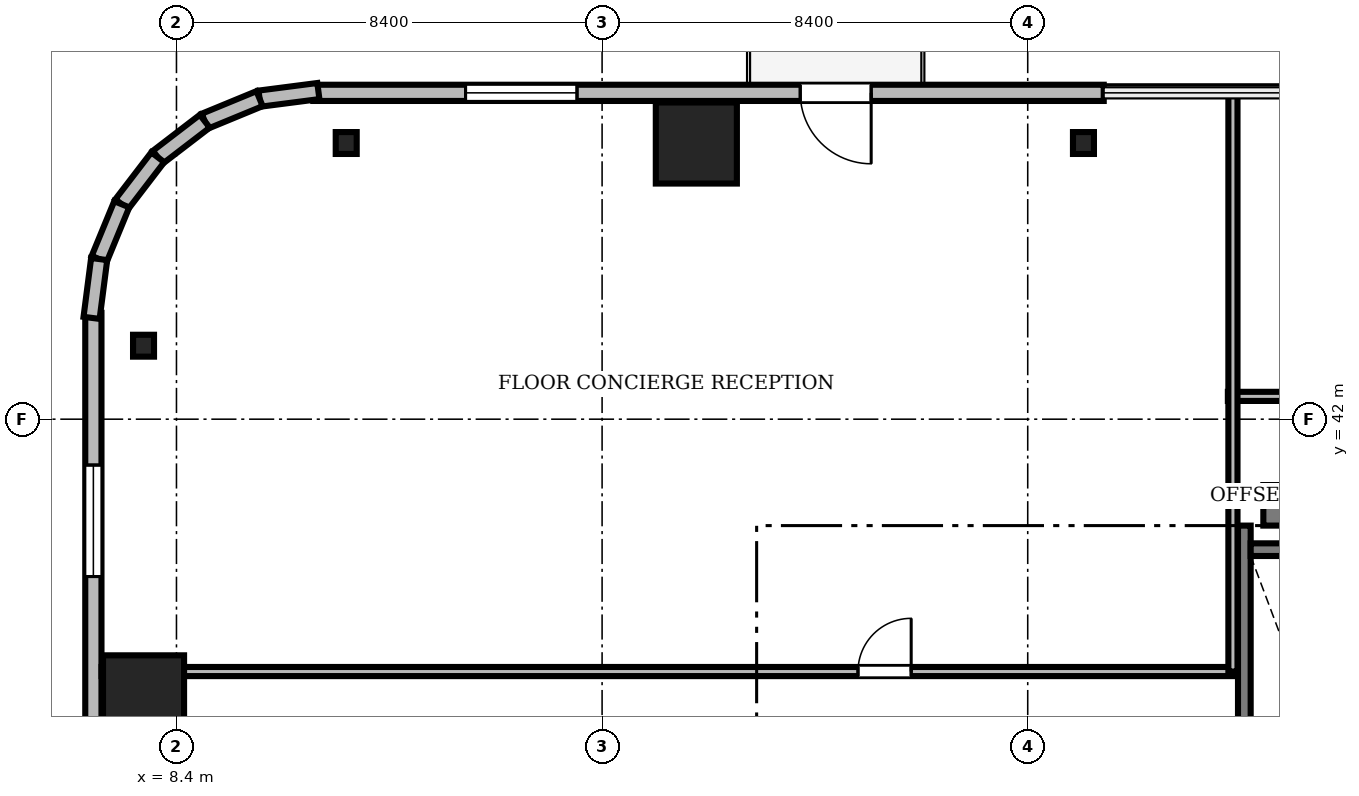
"""IFC4 building model, lengths in metres.
Left out: names, types, materials, properties, quantities, classifications, styles, units other than length and angle.
Written with IfcOpenShell. Run it as: python <this file> out.ifc"""

import sys

from ifc_helpers import new_model, si_unit, direction, frame, frame_2d, origin, origin_2d, place, context, subcontext, project, spatial, rectangle, i_section, extrude, source, transform, mapped, element, fill, save


model = new_model("IFC4")
c1 = context("Model", 3, precision=1e-05, world=origin(), true_north=direction((0.0, 1.0)))
c2 = subcontext(c1, "Body", "Model", "MODEL_VIEW")
j1 = project(units=[si_unit("LENGTHUNIT", "METRE"), si_unit("PLANEANGLEUNIT", "RADIAN")], contexts=[c1])
p1 = place(None, origin())
s1 = spatial("IfcSite", under=j1, at=p1, CompositionType="ELEMENT")
p2 = place(p1, origin())
s2 = spatial("IfcBuilding", under=s1, at=p2, CompositionType="ELEMENT")
p3 = place(p2, frame((0.0, 0.0, 122.4)))
s3 = spatial("IfcBuildingStorey", under=s2, at=p3, CompositionType="ELEMENT", Elevation=122.4)
m1 = source(origin(), c2, "Body", "SweptSolid", [
    extrude(rectangle(XDim=17.52, YDim=0.8, at=frame_2d((8.76, 0.0))), origin(), (0.0, 0.0, 1.0), 3.46),
])
p4 = place(p3, frame((29.85, 40.3, 0.0), z_axis=(0.0, 0.0, 1.0), x_axis=(1.0, 0.0, 0.0)))
e1 = element("IfcWall", 1, at=p4, inside=s3, PredefinedType="SHEAR", context=c2, shape_type="MappedRepresentation", body=[
    mapped(m1, transform((0.0, 0.0, 0.0), scale=1.0)),
])
m2 = source(origin(), c2, "Body", "SweptSolid", [
    extrude(rectangle(XDim=1.6, YDim=1.6, at=origin_2d()), origin(), (0.0, 0.0, 1.0), 3.46),
])
for number, where, z_axis, x_axis in (
    (2, (18.66, 47.45, 0.0), (0.0, 0.0, 1.0), (1.0, 0.0, 0.0)),
    (3, (7.75, 36.54, 0.0), (0.0, 0.0, 1.0), (1.0, 0.0, 0.0)),
):
    element("IfcColumn", number, at=place(p3, frame(where, z_axis=z_axis, x_axis=x_axis)), inside=s3, PredefinedType="COLUMN", context=c2, shape_type="MappedRepresentation", body=[
        mapped(m2, transform((0.0, 0.0, 0.0), scale=1.0)),
    ])
m3 = source(origin(), c2, "Body", "SweptSolid", [
    extrude(i_section(OverallWidth=0.414, OverallDepth=0.432, WebThickness=0.026, FlangeThickness=0.04, FilletRadius=0.015, at=origin_2d()), origin(), (0.0, 0.0, 1.0), 3.46),
])
for number, where, z_axis, x_axis in (
    (4, (26.3, 47.45, 0.0), (0.0, 0.0, 1.0), (1.0, 0.0, 0.0)),
    (5, (11.75, 47.45, 0.0), (0.0, 0.0, 1.0), (1.0, 0.0, 0.0)),
    (6, (7.75, 43.45, 0.0), (0.0, 0.0, 1.0), (1.0, 0.0, 0.0)),
):
    element("IfcColumn", number, at=place(p3, frame(where, z_axis=z_axis, x_axis=x_axis)), inside=s3, PredefinedType="COLUMN", context=c2, shape_type="MappedRepresentation", body=[
        mapped(m3, transform((0.0, 0.0, 0.0), scale=1.0)),
    ])
m4 = source(origin(), c2, "Body", "SweptSolid", [
    extrude(rectangle(XDim=15.6, YDim=0.32, at=frame_2d((7.8, 0.0))), origin(), (0.0, 0.0, 1.0), 3.46),
])
p5 = place(p3, frame((26.7, 48.44, 0.0), z_axis=(0.0, 0.0, 1.0), x_axis=(-1.0, 0.0, 0.0)))
e7 = element("IfcWall", 7, at=p5, inside=s3, PredefinedType="SOLIDWALL", context=c2, shape_type="MappedRepresentation", body=[
    mapped(m4, transform((0.0, 0.0, 0.0), scale=1.0)),
])
m5 = source(origin(), c2, "Body", "SweptSolid", [
    extrude(rectangle(XDim=1.4, YDim=2.3, at=frame_2d((0.7, 1.15))), frame((0.0, 0.17, 0.0), z_axis=(0.0, -1.0, 0.0), x_axis=(1.0, 0.0, 0.0)), (0.0, 0.0, 1.0), 0.34),
])
p6 = place(p5, frame((4.59, 0.0, 0.0)))
e8 = element("IfcOpeningElement", 8, at=p6, cuts=e7, PredefinedType="OPENING", context=c2, shape_type="MappedRepresentation", body=[
    mapped(m5, transform((0.0, 0.0, 0.0), scale=1.0)),
])
m6 = source(origin(), c2, "Body", "SweptSolid", [
    extrude(rectangle(XDim=2.2, YDim=2.4, at=frame_2d((1.1, 1.2))), frame((0.0, 0.17, 0.0), z_axis=(0.0, -1.0, 0.0), x_axis=(1.0, 0.0, 0.0)), (0.0, 0.0, 1.0), 0.34),
])
p7 = place(p5, frame((10.395, 0.0, 0.72)))
e9 = element("IfcOpeningElement", 9, at=p7, cuts=e7, PredefinedType="OPENING", context=c2, shape_type="MappedRepresentation", body=[
    mapped(m6, transform((0.0, 0.0, 0.0), scale=1.0)),
])
m7 = source(origin(), c2, "Body", "SweptSolid", [
    extrude(rectangle(XDim=15.6, YDim=0.32, at=frame_2d((7.8, 0.0))), origin(), (0.0, 0.0, 1.0), 3.46),
])
p8 = place(p3, frame((6.76, 44.1, 0.0), z_axis=(0.0, 0.0, 1.0), x_axis=(0.0, -1.0, 0.0)))
e10 = element("IfcWall", 10, at=p8, inside=s3, PredefinedType="SOLIDWALL", context=c2, shape_type="MappedRepresentation", body=[
    mapped(m7, transform((0.0, 0.0, 0.0), scale=1.0)),
])
p9 = place(p8, frame((3.005, 0.0, 0.72)))
e11 = element("IfcOpeningElement", 11, at=p9, cuts=e10, PredefinedType="OPENING", context=c2, shape_type="MappedRepresentation", body=[
    mapped(m6, transform((0.0, 0.0, 0.0), scale=1.0)),
])
m8 = source(origin(), c2, "Body", "SweptSolid", [
    extrude(rectangle(XDim=1.17, YDim=0.32, at=frame_2d((0.585, 0.0))), origin(), (0.0, 0.0, 1.0), 3.46),
])
p10 = place(p3, frame((11.2, 48.476, 0.0), z_axis=(0.0, 0.0, 1.0), x_axis=(-0.991735963317, -0.128295670475, 0.0)))
e12 = element("IfcWall", 12, at=p10, inside=s3, PredefinedType="SOLIDWALL", context=c2, shape_type="MappedRepresentation", body=[
    mapped(m8, transform((0.0, 0.0, 0.0), scale=1.0)),
])
m9 = source(origin(), c2, "Body", "SweptSolid", [
    extrude(rectangle(XDim=1.169, YDim=0.32, at=frame_2d((0.584, 0.0))), origin(), (0.0, 0.0, 1.0), 3.46),
])
p11 = place(p3, frame((10.04, 48.325, 0.0), z_axis=(0.0, 0.0, 1.0), x_axis=(-0.924552646638, -0.381054331552, 0.0)))
e13 = element("IfcWall", 13, at=p11, inside=s3, PredefinedType="SOLIDWALL", context=c2, shape_type="MappedRepresentation", body=[
    mapped(m9, transform((0.0, 0.0, 0.0), scale=1.0)),
])
m10 = source(origin(), c2, "Body", "SweptSolid", [
    extrude(rectangle(XDim=1.169, YDim=0.32, at=frame_2d((0.584, 0.0))), origin(), (0.0, 0.0, 1.0), 3.46),
])
p12 = place(p3, frame((8.959, 47.88, 0.0), z_axis=(0.0, 0.0, 1.0), x_axis=(-0.793663520347, -0.608356981114, 0.0)))
e14 = element("IfcWall", 14, at=p12, inside=s3, PredefinedType="SOLIDWALL", context=c2, shape_type="MappedRepresentation", body=[
    mapped(m10, transform((0.0, 0.0, 0.0), scale=1.0)),
])
m11 = source(origin(), c2, "Body", "SweptSolid", [
    extrude(rectangle(XDim=1.169, YDim=0.32, at=frame_2d((0.584, 0.0))), origin(), (0.0, 0.0, 1.0), 3.46),
])
p13 = place(p3, frame((8.031, 47.169, 0.0), z_axis=(0.0, 0.0, 1.0), x_axis=(-0.608387696831, -0.793639975269, 0.0)))
e15 = element("IfcWall", 15, at=p13, inside=s3, PredefinedType="SOLIDWALL", context=c2, shape_type="MappedRepresentation", body=[
    mapped(m11, transform((0.0, 0.0, 0.0), scale=1.0)),
])
p14 = place(p3, frame((7.32, 46.241, 0.0), z_axis=(0.0, 0.0, 1.0), x_axis=(-0.381054331552, -0.924552646638, 0.0)))
e16 = element("IfcWall", 16, at=p14, inside=s3, PredefinedType="SOLIDWALL", context=c2, shape_type="MappedRepresentation", body=[
    mapped(m9, transform((0.0, 0.0, 0.0), scale=1.0)),
])
p15 = place(p3, frame((6.875, 45.16, 0.0), z_axis=(0.0, 0.0, 1.0), x_axis=(-0.128295670475, -0.991735963317, 0.0)))
e17 = element("IfcWall", 17, at=p15, inside=s3, PredefinedType="SOLIDWALL", context=c2, shape_type="MappedRepresentation", body=[
    mapped(m8, transform((0.0, 0.0, 0.0), scale=1.0)),
])
m12 = source(origin(), c2, "Body", "SweptSolid", [
    extrude(rectangle(XDim=9.25, YDim=0.25, at=frame_2d((4.625, 0.0))), origin(), (0.0, 0.0, 1.0), 3.5),
])
p16 = place(p3, frame((29.475, 30.65, 0.0), z_axis=(0.0, 0.0, 1.0), x_axis=(0.0, 1.0, 0.0)))
e18 = element("IfcWall", 18, at=p16, inside=s3, PredefinedType="SOLIDWALL", context=c2, shape_type="MappedRepresentation", body=[
    mapped(m12, transform((0.0, 0.0, 0.0), scale=1.0)),
])
m13 = source(origin(), c2, "Body", "SweptSolid", [
    extrude(rectangle(XDim=3.15, YDim=0.25, at=frame_2d((1.575, 0.0))), origin(), (0.0, 0.0, 1.0), 3.5),
])
p17 = place(p3, frame((29.6, 39.425, 0.0), z_axis=(0.0, 0.0, 1.0), x_axis=(1.0, 0.0, 0.0)))
e19 = element("IfcWall", 19, at=p17, inside=s3, PredefinedType="SOLIDWALL", context=c2, shape_type="MappedRepresentation", body=[
    mapped(m13, transform((0.0, 0.0, 0.0), scale=1.0)),
])
m14 = source(origin(), c2, "Body", "SweptSolid", [
    extrude(rectangle(XDim=23.928, YDim=0.18, at=frame_2d((11.964, 0.0))), origin(), (0.0, 0.0, 1.0), 2.702),
])
p18 = place(p3, frame((29.15, 42.45, 0.0), z_axis=(0.0, 0.0, 1.0), x_axis=(1.0, 0.0, 0.0)))
e20 = element("IfcWall", 20, at=p18, inside=s3, PredefinedType="PARTITIONING", context=c2, shape_type="MappedRepresentation", body=[
    mapped(m14, transform((0.0, 0.0, 0.0), scale=1.0)),
])
m15 = source(origin(), c2, "Body", "SweptSolid", [
    extrude(rectangle(XDim=1.05, YDim=2.2, at=frame_2d((0.525, 1.1))), frame((0.0, 0.1, 0.0), z_axis=(0.0, -1.0, 0.0), x_axis=(1.0, 0.0, 0.0)), (0.0, 0.0, 1.0), 0.2),
])
p19 = place(p18, frame((4.5, 0.0, 0.0)))
e21 = element("IfcOpeningElement", 21, at=p19, cuts=e20, PredefinedType="OPENING", context=c2, shape_type="MappedRepresentation", body=[
    mapped(m15, transform((0.0, 0.0, 0.0), scale=1.0)),
])
m16 = source(origin(), c2, "Body", "SweptSolid", [
    extrude(rectangle(XDim=22.328, YDim=0.18, at=frame_2d((11.164, 0.0))), origin(), (0.0, 0.0, 1.0), 2.702),
])
p20 = place(p3, frame((6.922, 37.02, 0.0), z_axis=(0.0, 0.0, 1.0), x_axis=(1.0, 0.0, 0.0)))
e22 = element("IfcWall", 22, at=p20, inside=s3, PredefinedType="PARTITIONING", context=c2, shape_type="MappedRepresentation", body=[
    mapped(m16, transform((0.0, 0.0, 0.0), scale=1.0)),
])
p21 = place(p20, frame((14.928, 0.0, 0.0)))
e23 = element("IfcOpeningElement", 23, at=p21, cuts=e22, PredefinedType="OPENING", context=c2, shape_type="MappedRepresentation", body=[
    mapped(m15, transform((0.0, 0.0, 0.0), scale=1.0)),
])
m17 = source(origin(), c2, "Body", "SweptSolid", [
    extrude(rectangle(XDim=11.45, YDim=0.18, at=frame_2d((5.725, 0.0))), origin(), (0.0, 0.0, 1.0), 2.702),
])
p22 = place(p3, frame((29.25, 37.02, 0.0), z_axis=(0.0, 0.0, 1.0), x_axis=(0.0, 1.0, 0.0)))
e24 = element("IfcWall", 24, at=p22, inside=s3, PredefinedType="PARTITIONING", context=c2, shape_type="MappedRepresentation", body=[
    mapped(m17, transform((0.0, 0.0, 0.0), scale=1.0)),
])
m18 = source(origin(), c2, "Body", "SweptSolid", [
    extrude(rectangle(XDim=1.4, YDim=2.3, at=frame_2d((0.7, 1.15))), frame((0.0, 0.025, 0.0), z_axis=(0.0, -1.0, 0.0), x_axis=(1.0, 0.0, 0.0)), (0.0, 0.0, 1.0), 0.05),
])
p23 = place(p6, frame((1.4, 0.0, 0.0), z_axis=(0.0, 0.0, 1.0), x_axis=(-1.0, 0.0, 0.0)))
e25 = element("IfcDoor", 25, at=p23, inside=s3, OperationType="DOUBLE_DOOR_SLIDING", PredefinedType="DOOR", context=c2, shape_type="MappedRepresentation", body=[
    mapped(m18, transform((0.0, 0.0, 0.0), scale=1.0)),
])
fill(e8, e25)
m19 = source(origin(), c2, "Body", "SweptSolid", [
    extrude(rectangle(XDim=2.2, YDim=2.4, at=frame_2d((1.1, 1.2))), frame((0.0, 0.03, 0.0), z_axis=(0.0, -1.0, 0.0), x_axis=(1.0, 0.0, 0.0)), (0.0, 0.0, 1.0), 0.06),
])
p24 = place(p7, origin())
e26 = element("IfcWindow", 26, at=p24, inside=s3, PartitioningType="SINGLE_PANEL", PredefinedType="WINDOW", context=c2, shape_type="MappedRepresentation", body=[
    mapped(m19, transform((0.0, 0.0, 0.0), scale=1.0)),
])
fill(e9, e26)
p25 = place(p9, origin())
e27 = element("IfcWindow", 27, at=p25, inside=s3, PartitioningType="SINGLE_PANEL", PredefinedType="WINDOW", context=c2, shape_type="MappedRepresentation", body=[
    mapped(m19, transform((0.0, 0.0, 0.0), scale=1.0)),
])
fill(e11, e27)
m20 = source(origin(), c2, "Body", "SweptSolid", [
    extrude(rectangle(XDim=1.05, YDim=2.2, at=frame_2d((0.525, 1.1))), frame((0.0, 0.025, 0.0), z_axis=(0.0, -1.0, 0.0), x_axis=(1.0, 0.0, 0.0)), (0.0, 0.0, 1.0), 0.05),
])
p26 = place(p21, origin())
e28 = element("IfcDoor", 28, at=p26, inside=s3, OperationType="SINGLE_SWING_RIGHT", PredefinedType="DOOR", context=c2, shape_type="MappedRepresentation", body=[
    mapped(m20, transform((0.0, 0.0, 0.0), scale=1.0)),
])
fill(e23, e28)
save(model, sys.argv[1])
